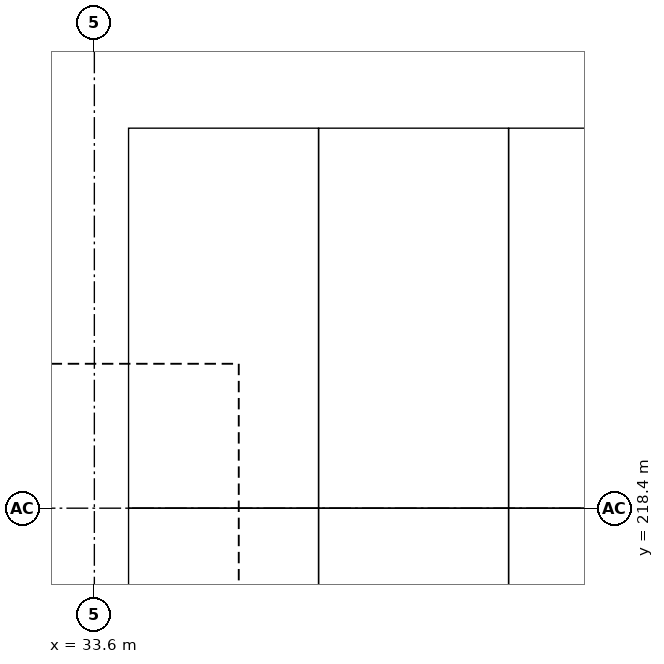
"""IFC4 building model, lengths in metres.
Left out: names, types, materials, properties, quantities, classifications, styles, units other than length and angle.
Written with IfcOpenShell. Run it as: python <this file> out.ifc"""

import sys

from ifc_helpers import new_model, si_unit, direction, frame, origin, origin_2d, place, context, subcontext, project, spatial, rectangle, extrude, element, save


model = new_model("IFC4")
c1 = context("Model", 3, precision=1e-05, world=origin(), true_north=direction((0.0, 1.0)))
c2 = subcontext(c1, "Body", "Model", "MODEL_VIEW")
j1 = project(units=[si_unit("LENGTHUNIT", "METRE"), si_unit("PLANEANGLEUNIT", "RADIAN")], contexts=[c1])
p1 = place(None, origin())
s1 = spatial("IfcSite", under=j1, at=p1, CompositionType="ELEMENT")
p2 = place(p1, origin())
s2 = spatial("IfcBuilding", under=s1, at=p2, CompositionType="ELEMENT")
p3 = place(p2, frame((0.0, 0.0, -3.0)))
s3 = spatial("IfcBuildingStorey", under=s2, at=p3, CompositionType="ELEMENT", Elevation=-3.0)
p4 = place(p3, frame((33.6, 218.4, 0.0), z_axis=(0.0, 0.0, 1.0), x_axis=(1.0, 0.0, 0.0)))
e1 = element("IfcColumn", 1, at=p4, inside=s3, PredefinedType="COLUMN", context=c2, shape_type="SweptSolid", body=[
    extrude(rectangle(XDim=0.8, YDim=0.8, at=origin_2d()), origin(), (0.0, 0.0, 1.0), 2.4),
])
save(model, sys.argv[1])
